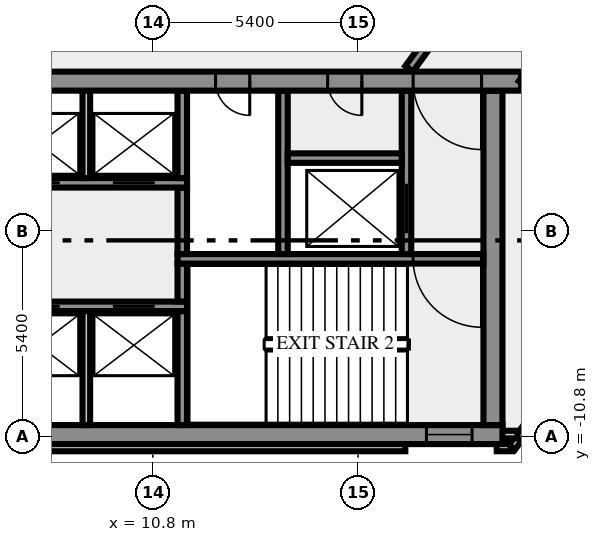
"""IFC4 building model, lengths in metres.
Left out: names, types, materials, properties, quantities, classifications, styles, units other than length and angle.
Written with IfcOpenShell. Run it as: python <this file> out.ifc"""

import sys

from ifc_helpers import new_model, si_unit, direction, frame, frame_2d, origin, place, context, subcontext, project, spatial, rectangle, extrude, element, fill, save


model = new_model("IFC4")
c1 = context("Model", 3, precision=1e-05, world=origin(), true_north=direction((0.0, 1.0)))
c2 = subcontext(c1, "Body", "Model", "MODEL_VIEW")
j1 = project(units=[si_unit("LENGTHUNIT", "METRE"), si_unit("PLANEANGLEUNIT", "RADIAN")], contexts=[c1])
p1 = place(None, origin())
s1 = spatial("IfcSite", under=j1, at=p1, CompositionType="ELEMENT")
p2 = place(p1, origin())
s2 = spatial("IfcBuilding", under=s1, at=p2, CompositionType="ELEMENT")
p3 = place(p2, frame((0.0, 0.0, 214.0)))
s3 = spatial("IfcBuildingStorey", under=s2, at=p3, CompositionType="ELEMENT", Elevation=214.0)
p4 = place(p3, frame((-17.444, -11.088, 0.0), z_axis=(0.0, 0.0, 1.0), x_axis=(1.0, 0.0, 0.0)))
e1 = element("IfcWall", 1, at=p4, inside=s3, PredefinedType="SOLIDWALL", context=c2, shape_type="SweptSolid", body=[
    extrude(rectangle(XDim=34.888, YDim=0.2, at=frame_2d((17.444, 0.0))), origin(), (0.0, 0.0, 1.0), 3.65),
])
p5 = place(p3, frame((19.85, -11.088, 0.0), z_axis=(0.0, 0.0, 1.0), x_axis=(1.0, 0.0, 0.0)))
e2 = element("IfcWall", 2, at=p5, inside=s3, PredefinedType="SOLIDWALL", context=c2, shape_type="SweptSolid", body=[
    extrude(rectangle(XDim=0.406, YDim=0.2, at=frame_2d((0.203, 0.0))), origin(), (0.0, 0.0, 1.0), 3.65),
])
p6 = place(p3, frame((20.253, -11.083, 0.0), z_axis=(0.0, 0.0, 1.0), x_axis=(0.587766567315, 0.809030569476, 0.0)))
e3 = element("IfcWall", 3, at=p6, inside=s3, PredefinedType="SOLIDWALL", context=c2, shape_type="SweptSolid", body=[
    extrude(rectangle(XDim=2.688, YDim=0.2, at=frame_2d((1.344, 0.0))), origin(), (0.0, 0.0, 1.0), 3.65),
])
p7 = place(p3, frame((19.98, -10.75, 0.0), z_axis=(0.0, 0.0, 1.0), x_axis=(1.0, 0.0, 0.0)))
e4 = element("IfcWall", 4, at=p7, inside=s3, PredefinedType="SOLIDWALL", context=c2, shape_type="SweptSolid", body=[
    extrude(rectangle(XDim=0.417, YDim=0.2, at=frame_2d((0.208, 0.0))), origin(), (0.0, 0.0, 1.0), 3.65),
])
p8 = place(p3, frame((-20.0, -10.75, 0.0), z_axis=(0.0, 0.0, 1.0), x_axis=(1.0, 0.0, 0.0)))
e5 = element("IfcWall", 5, at=p8, inside=s3, PredefinedType="SHEAR", context=c2, shape_type="SweptSolid", body=[
    extrude(rectangle(XDim=40.0, YDim=0.5, at=frame_2d((20.0, 0.0))), origin(), (0.0, 0.0, 1.0), 3.65),
])
p9 = place(p8, frame((0.8, 0.0, 1.0)))
e6 = element("IfcOpeningElement", 6, at=p9, cuts=e5, PredefinedType="OPENING", context=c2, shape_type="SweptSolid", body=[
    extrude(rectangle(XDim=1.2, YDim=1.2, at=frame_2d((0.6, 0.6))), frame((0.0, 0.26, 0.0), z_axis=(0.0, -1.0, 0.0), x_axis=(1.0, 0.0, 0.0)), (0.0, 0.0, 1.0), 0.52),
])
p10 = place(p8, frame((38.0, 0.0, 1.0)))
e7 = element("IfcOpeningElement", 7, at=p10, cuts=e5, PredefinedType="OPENING", context=c2, shape_type="SweptSolid", body=[
    extrude(rectangle(XDim=1.2, YDim=1.2, at=frame_2d((0.6, 0.6))), frame((0.0, 0.26, 0.0), z_axis=(0.0, -1.0, 0.0), x_axis=(1.0, 0.0, 0.0)), (0.0, 0.0, 1.0), 0.52),
])
p11 = place(p3, frame((9.05, -10.5, 0.0), z_axis=(0.0, 0.0, 1.0), x_axis=(0.0, 1.0, 0.0)))
e8 = element("IfcWall", 8, at=p11, inside=s3, PredefinedType="SOLIDWALL", context=c2, shape_type="SweptSolid", body=[
    extrude(rectangle(XDim=3.0, YDim=0.2, at=frame_2d((1.5, 0.0))), origin(), (0.0, 0.0, 1.0), 3.65),
])
p12 = place(p3, frame((11.575, -10.5, 0.0), z_axis=(0.0, 0.0, 1.0), x_axis=(0.0, 1.0, 0.0)))
e9 = element("IfcWall", 9, at=p12, inside=s3, PredefinedType="SHEAR", context=c2, shape_type="SweptSolid", body=[
    extrude(rectangle(XDim=3.0, YDim=0.25, at=frame_2d((1.5, 0.0))), origin(), (0.0, 0.0, 1.0), 3.65),
])
p13 = place(p3, frame((19.75, -10.5, 0.0), z_axis=(0.0, 0.0, 1.0), x_axis=(0.0, 1.0, 0.0)))
e10 = element("IfcWall", 10, at=p13, inside=s3, PredefinedType="SHEAR", context=c2, shape_type="SweptSolid", body=[
    extrude(rectangle(XDim=8.8, YDim=0.5, at=frame_2d((4.4, 0.0))), origin(), (0.0, 0.0, 1.0), 3.65),
])
p14 = place(p3, frame((11.7, -7.375, 0.0), z_axis=(0.0, 0.0, 1.0), x_axis=(-1.0, 0.0, 0.0)))
e11 = element("IfcWall", 11, at=p14, inside=s3, PredefinedType="SHEAR", context=c2, shape_type="SweptSolid", body=[
    extrude(rectangle(XDim=23.4, YDim=0.25, at=frame_2d((11.7, 0.0))), origin(), (0.0, 0.0, 1.0), 3.65),
])
p15 = place(p14, frame((21.312, 0.0, 0.0)))
e12 = element("IfcOpeningElement", 12, at=p15, cuts=e11, PredefinedType="OPENING", context=c2, shape_type="SweptSolid", body=[
    extrude(rectangle(XDim=0.9, YDim=2.1, at=frame_2d((0.45, 1.05))), frame((0.0, 0.135, 0.0), z_axis=(0.0, -1.0, 0.0), x_axis=(1.0, 0.0, 0.0)), (0.0, 0.0, 1.0), 0.27),
])
p16 = place(p14, frame((18.65, 0.0, 0.0)))
e13 = element("IfcOpeningElement", 13, at=p16, cuts=e11, PredefinedType="OPENING", context=c2, shape_type="SweptSolid", body=[
    extrude(rectangle(XDim=0.9, YDim=2.1, at=frame_2d((0.45, 1.05))), frame((0.0, 0.135, 0.0), z_axis=(0.0, -1.0, 0.0), x_axis=(1.0, 0.0, 0.0)), (0.0, 0.0, 1.0), 0.27),
])
p17 = place(p14, frame((16.388, 0.0, 0.0)))
e14 = element("IfcOpeningElement", 14, at=p17, cuts=e11, PredefinedType="OPENING", context=c2, shape_type="SweptSolid", body=[
    extrude(rectangle(XDim=0.9, YDim=2.1, at=frame_2d((0.45, 1.05))), frame((0.0, 0.135, 0.0), z_axis=(0.0, -1.0, 0.0), x_axis=(1.0, 0.0, 0.0)), (0.0, 0.0, 1.0), 0.27),
])
p18 = place(p14, frame((14.65, 0.0, 0.0)))
e15 = element("IfcOpeningElement", 15, at=p18, cuts=e11, PredefinedType="OPENING", context=c2, shape_type="SweptSolid", body=[
    extrude(rectangle(XDim=0.7, YDim=2.1, at=frame_2d((0.35, 1.05))), frame((0.0, 0.135, 0.0), z_axis=(0.0, -1.0, 0.0), x_axis=(1.0, 0.0, 0.0)), (0.0, 0.0, 1.0), 0.27),
])
p19 = place(p14, frame((13.35, 0.0, 0.0)))
e16 = element("IfcOpeningElement", 16, at=p19, cuts=e11, PredefinedType="OPENING", context=c2, shape_type="SweptSolid", body=[
    extrude(rectangle(XDim=0.9, YDim=2.1, at=frame_2d((0.45, 1.05))), frame((0.0, 0.135, 0.0), z_axis=(0.0, -1.0, 0.0), x_axis=(1.0, 0.0, 0.0)), (0.0, 0.0, 1.0), 0.27),
])
p20 = place(p14, frame((11.975, 0.0, 0.0)))
e17 = element("IfcOpeningElement", 17, at=p20, cuts=e11, PredefinedType="OPENING", context=c2, shape_type="SweptSolid", body=[
    extrude(rectangle(XDim=0.9, YDim=2.1, at=frame_2d((0.45, 1.05))), frame((0.0, 0.135, 0.0), z_axis=(0.0, -1.0, 0.0), x_axis=(1.0, 0.0, 0.0)), (0.0, 0.0, 1.0), 0.27),
])
p21 = place(p14, frame((10.5, 0.0, 0.0)))
e18 = element("IfcOpeningElement", 18, at=p21, cuts=e11, PredefinedType="OPENING", context=c2, shape_type="SweptSolid", body=[
    extrude(rectangle(XDim=0.9, YDim=2.1, at=frame_2d((0.45, 1.05))), frame((0.0, 0.135, 0.0), z_axis=(0.0, -1.0, 0.0), x_axis=(1.0, 0.0, 0.0)), (0.0, 0.0, 1.0), 0.27),
])
p22 = place(p14, frame((8.35, 0.0, 0.0)))
e19 = element("IfcOpeningElement", 19, at=p22, cuts=e11, PredefinedType="OPENING", context=c2, shape_type="SweptSolid", body=[
    extrude(rectangle(XDim=1.1, YDim=2.1, at=frame_2d((0.55, 1.05))), frame((0.0, 0.135, 0.0), z_axis=(0.0, -1.0, 0.0), x_axis=(1.0, 0.0, 0.0)), (0.0, 0.0, 1.0), 0.27),
])
p23 = place(p14, frame((5.85, 0.0, 0.0)))
e20 = element("IfcOpeningElement", 20, at=p23, cuts=e11, PredefinedType="OPENING", context=c2, shape_type="SweptSolid", body=[
    extrude(rectangle(XDim=1.1, YDim=2.1, at=frame_2d((0.55, 1.05))), frame((0.0, 0.135, 0.0), z_axis=(0.0, -1.0, 0.0), x_axis=(1.0, 0.0, 0.0)), (0.0, 0.0, 1.0), 0.27),
])
p24 = place(p14, frame((3.35, 0.0, 0.0)))
e21 = element("IfcOpeningElement", 21, at=p24, cuts=e11, PredefinedType="OPENING", context=c2, shape_type="SweptSolid", body=[
    extrude(rectangle(XDim=1.1, YDim=2.1, at=frame_2d((0.55, 1.05))), frame((0.0, 0.135, 0.0), z_axis=(0.0, -1.0, 0.0), x_axis=(1.0, 0.0, 0.0)), (0.0, 0.0, 1.0), 0.27),
])
p25 = place(p14, frame((0.85, 0.0, 0.0)))
e22 = element("IfcOpeningElement", 22, at=p25, cuts=e11, PredefinedType="OPENING", context=c2, shape_type="SweptSolid", body=[
    extrude(rectangle(XDim=1.1, YDim=2.1, at=frame_2d((0.55, 1.05))), frame((0.0, 0.135, 0.0), z_axis=(0.0, -1.0, 0.0), x_axis=(1.0, 0.0, 0.0)), (0.0, 0.0, 1.0), 0.27),
])
p26 = place(p3, frame((11.575, -7.25, 0.0), z_axis=(0.0, 0.0, 1.0), x_axis=(0.0, 1.0, 0.0)))
e23 = element("IfcWall", 23, at=p26, inside=s3, PredefinedType="SHEAR", context=c2, shape_type="SweptSolid", body=[
    extrude(rectangle(XDim=1.0, YDim=0.25, at=frame_2d((0.5, 0.0))), origin(), (0.0, 0.0, 1.0), 3.65),
])
p27 = place(p3, frame((19.5, -6.125, 0.0), z_axis=(0.0, 0.0, 1.0), x_axis=(-1.0, 0.0, 0.0)))
e24 = element("IfcWall", 24, at=p27, inside=s3, PredefinedType="SHEAR", context=c2, shape_type="SweptSolid", body=[
    extrude(rectangle(XDim=8.05, YDim=0.25, at=frame_2d((4.025, 0.0))), origin(), (0.0, 0.0, 1.0), 3.65),
])
p28 = place(p27, frame((0.05, 0.0, 0.0)))
e25 = element("IfcOpeningElement", 25, at=p28, cuts=e24, PredefinedType="OPENING", context=c2, shape_type="SweptSolid", body=[
    extrude(rectangle(XDim=1.8, YDim=2.1, at=frame_2d((0.9, 1.05))), frame((0.0, 0.135, 0.0), z_axis=(0.0, -1.0, 0.0), x_axis=(1.0, 0.0, 0.0)), (0.0, 0.0, 1.0), 0.27),
])
p29 = place(p3, frame((11.575, -6.0, 0.0), z_axis=(0.0, 0.0, 1.0), x_axis=(0.0, 1.0, 0.0)))
e26 = element("IfcWall", 26, at=p29, inside=s3, PredefinedType="SHEAR", context=c2, shape_type="SweptSolid", body=[
    extrude(rectangle(XDim=1.75, YDim=0.25, at=frame_2d((0.875, 0.0))), origin(), (0.0, 0.0, 1.0), 3.65),
])
p30 = place(p3, frame((14.225, -6.0, 0.0), z_axis=(0.0, 0.0, 1.0), x_axis=(0.0, 1.0, 0.0)))
e27 = element("IfcWall", 27, at=p30, inside=s3, PredefinedType="SHEAR", context=c2, shape_type="SweptSolid", body=[
    extrude(rectangle(XDim=4.3, YDim=0.25, at=frame_2d((2.15, 0.0))), origin(), (0.0, 0.0, 1.0), 3.65),
])
p31 = place(p3, frame((17.475, -6.0, 0.0), z_axis=(0.0, 0.0, 1.0), x_axis=(0.0, 1.0, 0.0)))
e28 = element("IfcWall", 28, at=p31, inside=s3, PredefinedType="SHEAR", context=c2, shape_type="SweptSolid", body=[
    extrude(rectangle(XDim=4.3, YDim=0.25, at=frame_2d((2.15, 0.0))), origin(), (0.0, 0.0, 1.0), 3.65),
])
p32 = place(p31, frame((0.55, 0.0, 0.0)))
e29 = element("IfcOpeningElement", 29, at=p32, cuts=e28, PredefinedType="OPENING", context=c2, shape_type="SweptSolid", body=[
    extrude(rectangle(XDim=1.3, YDim=2.1, at=frame_2d((0.65, 1.05))), frame((0.0, 0.135, 0.0), z_axis=(0.0, -1.0, 0.0), x_axis=(1.0, 0.0, 0.0)), (0.0, 0.0, 1.0), 0.27),
])
p33 = place(p3, frame((1.45, -4.125, 0.0), z_axis=(0.0, 0.0, 1.0), x_axis=(1.0, 0.0, 0.0)))
e30 = element("IfcWall", 30, at=p33, inside=s3, PredefinedType="SHEAR", context=c2, shape_type="SweptSolid", body=[
    extrude(rectangle(XDim=10.25, YDim=0.25, at=frame_2d((5.125, 0.0))), origin(), (0.0, 0.0, 1.0), 3.65),
])
p34 = place(p33, frame((0.7, 0.0, 0.0)))
e31 = element("IfcOpeningElement", 31, at=p34, cuts=e30, PredefinedType="OPENING", context=c2, shape_type="SweptSolid", body=[
    extrude(rectangle(XDim=1.3, YDim=2.1, at=frame_2d((0.65, 1.05))), frame((0.0, 0.135, 0.0), z_axis=(0.0, -1.0, 0.0), x_axis=(1.0, 0.0, 0.0)), (0.0, 0.0, 1.0), 0.27),
])
p35 = place(p33, frame((3.3, 0.0, 0.0)))
e32 = element("IfcOpeningElement", 32, at=p35, cuts=e30, PredefinedType="OPENING", context=c2, shape_type="SweptSolid", body=[
    extrude(rectangle(XDim=1.1, YDim=2.1, at=frame_2d((0.55, 1.05))), frame((0.0, 0.135, 0.0), z_axis=(0.0, -1.0, 0.0), x_axis=(1.0, 0.0, 0.0)), (0.0, 0.0, 1.0), 0.27),
])
p36 = place(p33, frame((5.8, 0.0, 0.0)))
e33 = element("IfcOpeningElement", 33, at=p36, cuts=e30, PredefinedType="OPENING", context=c2, shape_type="SweptSolid", body=[
    extrude(rectangle(XDim=1.1, YDim=2.1, at=frame_2d((0.55, 1.05))), frame((0.0, 0.135, 0.0), z_axis=(0.0, -1.0, 0.0), x_axis=(1.0, 0.0, 0.0)), (0.0, 0.0, 1.0), 0.27),
])
p37 = place(p33, frame((8.3, 0.0, 0.0)))
e34 = element("IfcOpeningElement", 34, at=p37, cuts=e30, PredefinedType="OPENING", context=c2, shape_type="SweptSolid", body=[
    extrude(rectangle(XDim=1.1, YDim=2.1, at=frame_2d((0.55, 1.05))), frame((0.0, 0.135, 0.0), z_axis=(0.0, -1.0, 0.0), x_axis=(1.0, 0.0, 0.0)), (0.0, 0.0, 1.0), 0.27),
])
p38 = place(p3, frame((9.05, -4.0, 0.0), z_axis=(0.0, 0.0, 1.0), x_axis=(0.0, 1.0, 0.0)))
e35 = element("IfcWall", 35, at=p38, inside=s3, PredefinedType="SOLIDWALL", context=c2, shape_type="SweptSolid", body=[
    extrude(rectangle(XDim=2.3, YDim=0.2, at=frame_2d((1.15, 0.0))), origin(), (0.0, 0.0, 1.0), 3.65),
])
p39 = place(p3, frame((11.575, -4.0, 0.0), z_axis=(0.0, 0.0, 1.0), x_axis=(0.0, 1.0, 0.0)))
e36 = element("IfcWall", 36, at=p39, inside=s3, PredefinedType="SHEAR", context=c2, shape_type="SweptSolid", body=[
    extrude(rectangle(XDim=2.3, YDim=0.25, at=frame_2d((1.15, 0.0))), origin(), (0.0, 0.0, 1.0), 3.65),
])
p40 = place(p3, frame((14.35, -3.475, 0.0), z_axis=(0.0, 0.0, 1.0), x_axis=(1.0, 0.0, 0.0)))
e37 = element("IfcWall", 37, at=p40, inside=s3, PredefinedType="SHEAR", context=c2, shape_type="SweptSolid", body=[
    extrude(rectangle(XDim=3.0, YDim=0.25, at=frame_2d((1.5, 0.0))), origin(), (0.0, 0.0, 1.0), 3.65),
])
p41 = place(p3, frame((20.49, -1.45, 0.0), z_axis=(0.0, 0.0, 1.0), x_axis=(-1.0, 0.0, 0.0)))
e38 = element("IfcWall", 38, at=p41, inside=s3, PredefinedType="SHEAR", context=c2, shape_type="SweptSolid", body=[
    extrude(rectangle(XDim=40.98, YDim=0.5, at=frame_2d((20.49, 0.0))), origin(), (0.0, 0.0, 1.0), 3.65),
])
p42 = place(p41, frame((38.14, 0.0, 0.0)))
e39 = element("IfcOpeningElement", 39, at=p42, cuts=e38, PredefinedType="OPENING", context=c2, shape_type="SweptSolid", body=[
    extrude(rectangle(XDim=1.8, YDim=2.1, at=frame_2d((0.9, 1.05))), frame((0.0, 0.26, 0.0), z_axis=(0.0, -1.0, 0.0), x_axis=(1.0, 0.0, 0.0)), (0.0, 0.0, 1.0), 0.52),
])
p43 = place(p41, frame((36.728, 0.0, 0.0)))
e40 = element("IfcOpeningElement", 40, at=p43, cuts=e38, PredefinedType="OPENING", context=c2, shape_type="SweptSolid", body=[
    extrude(rectangle(XDim=0.8, YDim=2.1, at=frame_2d((0.4, 1.05))), frame((0.0, 0.26, 0.0), z_axis=(0.0, -1.0, 0.0), x_axis=(1.0, 0.0, 0.0)), (0.0, 0.0, 1.0), 0.52),
])
p44 = place(p41, frame((35.153, 0.0, 0.0)))
e41 = element("IfcOpeningElement", 41, at=p44, cuts=e38, PredefinedType="OPENING", context=c2, shape_type="SweptSolid", body=[
    extrude(rectangle(XDim=0.8, YDim=2.1, at=frame_2d((0.4, 1.05))), frame((0.0, 0.26, 0.0), z_axis=(0.0, -1.0, 0.0), x_axis=(1.0, 0.0, 0.0)), (0.0, 0.0, 1.0), 0.52),
])
p45 = place(p41, frame((32.94, 0.0, 0.0)))
e42 = element("IfcOpeningElement", 42, at=p45, cuts=e38, PredefinedType="OPENING", context=c2, shape_type="SweptSolid", body=[
    extrude(rectangle(XDim=0.9, YDim=2.1, at=frame_2d((0.45, 1.05))), frame((0.0, 0.26, 0.0), z_axis=(0.0, -1.0, 0.0), x_axis=(1.0, 0.0, 0.0)), (0.0, 0.0, 1.0), 0.52),
])
p46 = place(p41, frame((30.702, 0.0, 0.0)))
e43 = element("IfcOpeningElement", 43, at=p46, cuts=e38, PredefinedType="OPENING", context=c2, shape_type="SweptSolid", body=[
    extrude(rectangle(XDim=0.9, YDim=2.1, at=frame_2d((0.45, 1.05))), frame((0.0, 0.26, 0.0), z_axis=(0.0, -1.0, 0.0), x_axis=(1.0, 0.0, 0.0)), (0.0, 0.0, 1.0), 0.52),
])
p47 = place(p41, frame((28.64, 0.0, 0.0)))
e44 = element("IfcOpeningElement", 44, at=p47, cuts=e38, PredefinedType="OPENING", context=c2, shape_type="SweptSolid", body=[
    extrude(rectangle(XDim=0.9, YDim=2.1, at=frame_2d((0.45, 1.05))), frame((0.0, 0.26, 0.0), z_axis=(0.0, -1.0, 0.0), x_axis=(1.0, 0.0, 0.0)), (0.0, 0.0, 1.0), 0.52),
])
p48 = place(p41, frame((25.778, 0.0, 0.0)))
e45 = element("IfcOpeningElement", 45, at=p48, cuts=e38, PredefinedType="OPENING", context=c2, shape_type="SweptSolid", body=[
    extrude(rectangle(XDim=0.9, YDim=2.1, at=frame_2d((0.45, 1.05))), frame((0.0, 0.26, 0.0), z_axis=(0.0, -1.0, 0.0), x_axis=(1.0, 0.0, 0.0)), (0.0, 0.0, 1.0), 0.52),
])
p49 = place(p41, frame((19.59, 0.0, 0.0)))
e46 = element("IfcOpeningElement", 46, at=p49, cuts=e38, PredefinedType="OPENING", context=c2, shape_type="SweptSolid", body=[
    extrude(rectangle(XDim=2.0, YDim=2.1, at=frame_2d((1.0, 1.05))), frame((0.0, 0.26, 0.0), z_axis=(0.0, -1.0, 0.0), x_axis=(1.0, 0.0, 0.0)), (0.0, 0.0, 1.0), 0.52),
])
p50 = place(p41, frame((7.14, 0.0, 0.0)))
e47 = element("IfcOpeningElement", 47, at=p50, cuts=e38, PredefinedType="OPENING", context=c2, shape_type="SweptSolid", body=[
    extrude(rectangle(XDim=0.9, YDim=2.1, at=frame_2d((0.45, 1.05))), frame((0.0, 0.26, 0.0), z_axis=(0.0, -1.0, 0.0), x_axis=(1.0, 0.0, 0.0)), (0.0, 0.0, 1.0), 0.52),
])
p51 = place(p41, frame((4.19, 0.0, 0.0)))
e48 = element("IfcOpeningElement", 48, at=p51, cuts=e38, PredefinedType="OPENING", context=c2, shape_type="SweptSolid", body=[
    extrude(rectangle(XDim=0.9, YDim=2.1, at=frame_2d((0.45, 1.05))), frame((0.0, 0.26, 0.0), z_axis=(0.0, -1.0, 0.0), x_axis=(1.0, 0.0, 0.0)), (0.0, 0.0, 1.0), 0.52),
])
p52 = place(p41, frame((1.04, 0.0, 0.0)))
e49 = element("IfcOpeningElement", 49, at=p52, cuts=e38, PredefinedType="OPENING", context=c2, shape_type="SweptSolid", body=[
    extrude(rectangle(XDim=1.8, YDim=2.1, at=frame_2d((0.9, 1.05))), frame((0.0, 0.26, 0.0), z_axis=(0.0, -1.0, 0.0), x_axis=(1.0, 0.0, 0.0)), (0.0, 0.0, 1.0), 0.52),
])
p53 = place(p3, frame((17.545, -1.125, 0.0), z_axis=(0.0, 0.0, 1.0), x_axis=(0.58779555165, 0.809009511354, 0.0)))
e50 = element("IfcWall", 50, at=p53, inside=s3, PredefinedType="SOLIDWALL", context=c2, shape_type="SweptSolid", body=[
    extrude(rectangle(XDim=18.103, YDim=0.25, at=frame_2d((9.052, 0.0))), origin(), (0.0, 0.0, 1.0), 3.65),
])
p54 = place(p53, frame((16.728, 0.0, 0.0)))
e51 = element("IfcOpeningElement", 51, at=p54, cuts=e50, PredefinedType="OPENING", context=c2, shape_type="SweptSolid", body=[
    extrude(rectangle(XDim=0.9, YDim=2.1, at=frame_2d((0.45, 1.05))), frame((0.0, 0.135, 0.0), z_axis=(0.0, -1.0, 0.0), x_axis=(1.0, 0.0, 0.0)), (0.0, 0.0, 1.0), 0.27),
])
p55 = place(p3, frame((30.183, 11.761, 0.0), z_axis=(0.0, 0.0, 1.0), x_axis=(-0.587781762867, -0.80901952958, 0.0)))
e52 = element("IfcWall", 52, at=p55, inside=s3, PredefinedType="SOLIDWALL", context=c2, shape_type="SweptSolid", body=[
    extrude(rectangle(XDim=16.42, YDim=0.25, at=frame_2d((8.21, 0.0))), origin(), (0.0, 0.0, 1.0), 3.65),
])
p56 = place(p55, frame((14.988, 0.0, 0.0)))
e53 = element("IfcOpeningElement", 53, at=p56, cuts=e52, PredefinedType="OPENING", context=c2, shape_type="SweptSolid", body=[
    extrude(rectangle(XDim=0.9, YDim=2.1, at=frame_2d((0.45, 1.05))), frame((0.0, 0.135, 0.0), z_axis=(0.0, -1.0, 0.0), x_axis=(1.0, 0.0, 0.0)), (0.0, 0.0, 1.0), 0.27),
])
p57 = place(p55, frame((0.225, 0.0, 0.0)))
e54 = element("IfcOpeningElement", 54, at=p57, cuts=e52, PredefinedType="OPENING", context=c2, shape_type="SweptSolid", body=[
    extrude(rectangle(XDim=0.9, YDim=2.1, at=frame_2d((0.45, 1.05))), frame((0.0, 0.135, 0.0), z_axis=(0.0, -1.0, 0.0), x_axis=(1.0, 0.0, 0.0)), (0.0, 0.0, 1.0), 0.27),
])
p58 = place(p10, origin())
e55 = element("IfcWindow", 55, at=p58, inside=s3, PartitioningType="SINGLE_PANEL", PredefinedType="WINDOW", context=c2, shape_type="SweptSolid", body=[
    extrude(rectangle(XDim=1.2, YDim=1.2, at=frame_2d((0.6, 0.6))), frame((0.0, 0.03, 0.0), z_axis=(0.0, -1.0, 0.0), x_axis=(1.0, 0.0, 0.0)), (0.0, 0.0, 1.0), 0.06),
])
fill(e7, e55)
p59 = place(p24, origin())
e56 = element("IfcDoor", 56, at=p59, inside=s3, OperationType="DOUBLE_DOOR_SLIDING", PredefinedType="DOOR", context=c2, shape_type="SweptSolid", body=[
    extrude(rectangle(XDim=1.1, YDim=2.1, at=frame_2d((0.55, 1.05))), frame((0.0, 0.025, 0.0), z_axis=(0.0, -1.0, 0.0), x_axis=(1.0, 0.0, 0.0)), (0.0, 0.0, 1.0), 0.05),
])
fill(e21, e56)
p60 = place(p25, origin())
e57 = element("IfcDoor", 57, at=p60, inside=s3, OperationType="DOUBLE_DOOR_SLIDING", PredefinedType="DOOR", context=c2, shape_type="SweptSolid", body=[
    extrude(rectangle(XDim=1.1, YDim=2.1, at=frame_2d((0.55, 1.05))), frame((0.0, 0.025, 0.0), z_axis=(0.0, -1.0, 0.0), x_axis=(1.0, 0.0, 0.0)), (0.0, 0.0, 1.0), 0.05),
])
fill(e22, e57)
p61 = place(p28, origin())
e58 = element("IfcDoor", 58, at=p61, inside=s3, OperationType="DOUBLE_DOOR_SINGLE_SWING", PredefinedType="DOOR", context=c2, shape_type="SweptSolid", body=[
    extrude(rectangle(XDim=1.8, YDim=2.1, at=frame_2d((0.9, 1.05))), frame((0.0, 0.025, 0.0), z_axis=(0.0, -1.0, 0.0), x_axis=(1.0, 0.0, 0.0)), (0.0, 0.0, 1.0), 0.05),
])
fill(e25, e58)
p62 = place(p32, origin())
e59 = element("IfcDoor", 59, at=p62, inside=s3, OperationType="DOUBLE_DOOR_SLIDING", PredefinedType="DOOR", context=c2, shape_type="SweptSolid", body=[
    extrude(rectangle(XDim=1.3, YDim=2.1, at=frame_2d((0.65, 1.05))), frame((0.0, 0.025, 0.0), z_axis=(0.0, -1.0, 0.0), x_axis=(1.0, 0.0, 0.0)), (0.0, 0.0, 1.0), 0.05),
])
fill(e29, e59)
p63 = place(p36, origin())
e60 = element("IfcDoor", 60, at=p63, inside=s3, OperationType="DOUBLE_DOOR_SLIDING", PredefinedType="DOOR", context=c2, shape_type="SweptSolid", body=[
    extrude(rectangle(XDim=1.1, YDim=2.1, at=frame_2d((0.55, 1.05))), frame((0.0, 0.025, 0.0), z_axis=(0.0, -1.0, 0.0), x_axis=(1.0, 0.0, 0.0)), (0.0, 0.0, 1.0), 0.05),
])
fill(e33, e60)
p64 = place(p37, origin())
e61 = element("IfcDoor", 61, at=p64, inside=s3, OperationType="DOUBLE_DOOR_SLIDING", PredefinedType="DOOR", context=c2, shape_type="SweptSolid", body=[
    extrude(rectangle(XDim=1.1, YDim=2.1, at=frame_2d((0.55, 1.05))), frame((0.0, 0.025, 0.0), z_axis=(0.0, -1.0, 0.0), x_axis=(1.0, 0.0, 0.0)), (0.0, 0.0, 1.0), 0.05),
])
fill(e34, e61)
p65 = place(p50, origin())
e62 = element("IfcDoor", 62, at=p65, inside=s3, OperationType="SINGLE_SWING_LEFT", PredefinedType="DOOR", context=c2, shape_type="SweptSolid", body=[
    extrude(rectangle(XDim=0.9, YDim=2.1, at=frame_2d((0.45, 1.05))), frame((0.0, 0.025, 0.0), z_axis=(0.0, -1.0, 0.0), x_axis=(1.0, 0.0, 0.0)), (0.0, 0.0, 1.0), 0.05),
])
fill(e47, e62)
p66 = place(p51, origin())
e63 = element("IfcDoor", 63, at=p66, inside=s3, OperationType="SINGLE_SWING_LEFT", PredefinedType="DOOR", context=c2, shape_type="SweptSolid", body=[
    extrude(rectangle(XDim=0.9, YDim=2.1, at=frame_2d((0.45, 1.05))), frame((0.0, 0.025, 0.0), z_axis=(0.0, -1.0, 0.0), x_axis=(1.0, 0.0, 0.0)), (0.0, 0.0, 1.0), 0.05),
])
fill(e48, e63)
p67 = place(p52, origin())
e64 = element("IfcDoor", 64, at=p67, inside=s3, OperationType="DOUBLE_DOOR_SINGLE_SWING", PredefinedType="DOOR", context=c2, shape_type="SweptSolid", body=[
    extrude(rectangle(XDim=1.8, YDim=2.1, at=frame_2d((0.9, 1.05))), frame((0.0, 0.025, 0.0), z_axis=(0.0, -1.0, 0.0), x_axis=(1.0, 0.0, 0.0)), (0.0, 0.0, 1.0), 0.05),
])
fill(e49, e64)
save(model, sys.argv[1])
